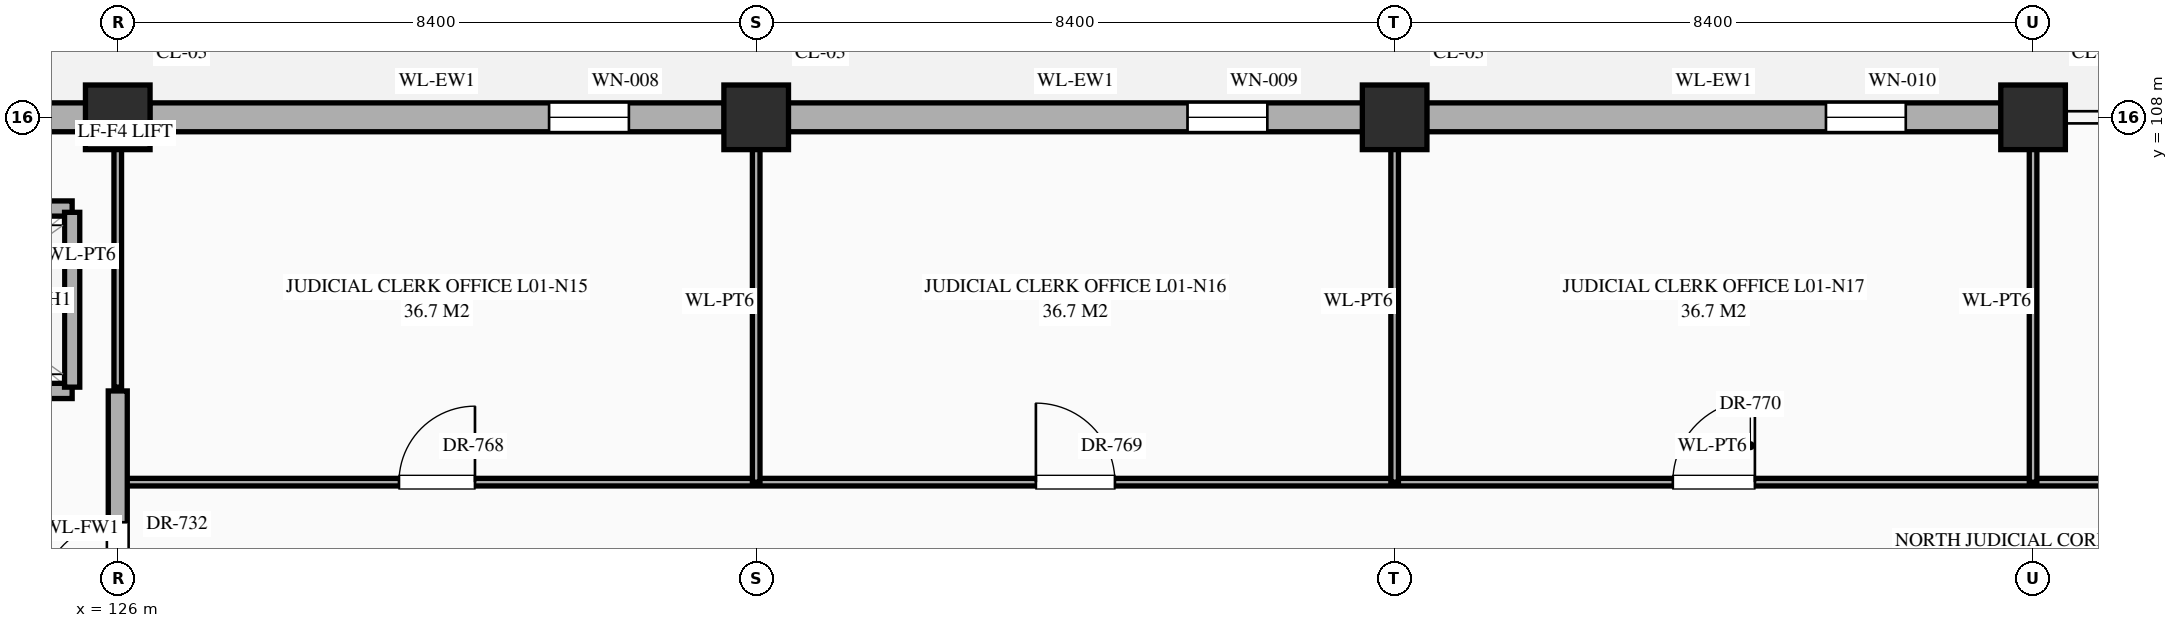
"""IFC4 building model, lengths in metres.
Left out: names, types, materials, properties, quantities, classifications, styles, units other than length and angle.
Written with IfcOpenShell. Run it as: python <this file> out.ifc"""

import sys

from ifc_helpers import new_model, si_unit, direction, frame, frame_2d, origin, origin_2d, place, context, subcontext, project, spatial, rectangle, extrude, element, fill, save


model = new_model("IFC4")
c1 = context("Model", 3, precision=1e-05, world=origin(), true_north=direction((0.0, 1.0)))
c2 = subcontext(c1, "Body", "Model", "MODEL_VIEW")
j1 = project(units=[si_unit("LENGTHUNIT", "METRE"), si_unit("PLANEANGLEUNIT", "RADIAN")], contexts=[c1])
p1 = place(None, origin())
s1 = spatial("IfcSite", under=j1, at=p1, CompositionType="ELEMENT")
p2 = place(p1, origin())
s2 = spatial("IfcBuilding", under=s1, at=p2, CompositionType="ELEMENT")
p3 = place(p2, origin())
s3 = spatial("IfcBuildingStorey", under=s2, at=p3, CompositionType="ELEMENT", Elevation=0.0)
for number, where, z_axis, x_axis in (
    (1, (126.0, 108.0, 0.0), (0.0, 0.0, 1.0), (1.0, 0.0, 0.0)),
    (2, (134.4, 108.0, 0.0), (0.0, 0.0, 1.0), (1.0, 0.0, 0.0)),
    (3, (142.8, 108.0, 0.0), (0.0, 0.0, 1.0), (1.0, 0.0, 0.0)),
    (4, (151.2, 108.0, 0.0), (0.0, 0.0, 1.0), (1.0, 0.0, 0.0)),
):
    element("IfcColumn", number, at=place(p3, frame(where, z_axis=z_axis, x_axis=x_axis)), inside=s3, PredefinedType="COLUMN", context=c2, shape_type="SweptSolid", body=[
        extrude(rectangle(XDim=0.85, YDim=0.85, at=origin_2d()), origin(), (0.0, 0.0, 1.0), 5.4),
    ])
p4 = place(p3, frame((118.045, 108.0, 0.0), z_axis=(0.0, 0.0, 1.0), x_axis=(1.0, 0.0, 0.0)))
e5 = element("IfcWall", 5, at=p4, inside=s3, PredefinedType="STANDARD", context=c2, shape_type="SweptSolid", body=[
    extrude(rectangle(XDim=7.535, YDim=0.38, at=frame_2d((3.768, 0.0))), origin(), (0.0, 0.0, 1.0), 4.47),
])
p5 = place(p3, frame((126.42, 108.0, 0.0), z_axis=(0.0, 0.0, 1.0), x_axis=(1.0, 0.0, 0.0)))
e6 = element("IfcWall", 6, at=p5, inside=s3, PredefinedType="STANDARD", context=c2, shape_type="SweptSolid", body=[
    extrude(rectangle(XDim=7.56, YDim=0.38, at=frame_2d((3.78, 0.0))), origin(), (0.0, 0.0, 1.0), 4.47),
])
p6 = place(p5, frame((5.255, 0.0, 0.85)))
e7 = element("IfcOpeningElement", 7, at=p6, cuts=e6, PredefinedType="OPENING", context=c2, shape_type="SweptSolid", body=[
    extrude(rectangle(XDim=1.05, YDim=1.56, at=frame_2d((0.525, 0.78))), frame((0.0, 0.202, 0.0), z_axis=(0.0, -1.0, 0.0), x_axis=(1.0, 0.0, 0.0)), (0.0, 0.0, 1.0), 0.404),
])
p7 = place(p3, frame((134.82, 108.0, 0.0), z_axis=(0.0, 0.0, 1.0), x_axis=(1.0, 0.0, 0.0)))
e8 = element("IfcWall", 8, at=p7, inside=s3, PredefinedType="STANDARD", context=c2, shape_type="SweptSolid", body=[
    extrude(rectangle(XDim=7.56, YDim=0.38, at=frame_2d((3.78, 0.0))), origin(), (0.0, 0.0, 1.0), 4.47),
])
p8 = place(p7, frame((5.255, 0.0, 0.85)))
e9 = element("IfcOpeningElement", 9, at=p8, cuts=e8, PredefinedType="OPENING", context=c2, shape_type="SweptSolid", body=[
    extrude(rectangle(XDim=1.05, YDim=1.74, at=frame_2d((0.525, 0.87))), frame((0.0, 0.202, 0.0), z_axis=(0.0, -1.0, 0.0), x_axis=(1.0, 0.0, 0.0)), (0.0, 0.0, 1.0), 0.404),
])
p9 = place(p3, frame((143.22, 108.0, 0.0), z_axis=(0.0, 0.0, 1.0), x_axis=(1.0, 0.0, 0.0)))
e10 = element("IfcWall", 10, at=p9, inside=s3, PredefinedType="STANDARD", context=c2, shape_type="SweptSolid", body=[
    extrude(rectangle(XDim=7.56, YDim=0.38, at=frame_2d((3.78, 0.0))), origin(), (0.0, 0.0, 1.0), 4.47),
])
p10 = place(p9, frame((5.255, 0.0, 0.85)))
e11 = element("IfcOpeningElement", 11, at=p10, cuts=e10, PredefinedType="OPENING", context=c2, shape_type="SweptSolid", body=[
    extrude(rectangle(XDim=1.05, YDim=1.92, at=frame_2d((0.525, 0.96))), frame((0.0, 0.202, 0.0), z_axis=(0.0, -1.0, 0.0), x_axis=(1.0, 0.0, 0.0)), (0.0, 0.0, 1.0), 0.404),
])
p11 = place(p3, frame((126.0, 103.2, 0.0), z_axis=(0.0, 0.0, 1.0), x_axis=(1.0, 0.0, 0.0)))
e12 = element("IfcWall", 12, at=p11, inside=s3, PredefinedType="STANDARD", context=c2, shape_type="SweptSolid", body=[
    extrude(rectangle(XDim=41.96, YDim=0.1, at=frame_2d((20.98, 0.0))), origin(), (0.0, 0.0, 1.0), 5.12),
])
p12 = place(p11, frame((3.7, 0.0, 0.0)))
e13 = element("IfcOpeningElement", 13, at=p12, cuts=e12, PredefinedType="OPENING", context=c2, shape_type="SweptSolid", body=[
    extrude(rectangle(XDim=1.0, YDim=2.25, at=frame_2d((0.5, 1.125))), frame((0.0, 0.062, 0.0), z_axis=(0.0, -1.0, 0.0), x_axis=(1.0, 0.0, 0.0)), (0.0, 0.0, 1.0), 0.124),
])
p13 = place(p11, frame((12.08, 0.0, 0.0)))
e14 = element("IfcOpeningElement", 14, at=p13, cuts=e12, PredefinedType="OPENING", context=c2, shape_type="SweptSolid", body=[
    extrude(rectangle(XDim=1.04, YDim=2.2, at=frame_2d((0.52, 1.1))), frame((0.0, 0.062, 0.0), z_axis=(0.0, -1.0, 0.0), x_axis=(1.0, 0.0, 0.0)), (0.0, 0.0, 1.0), 0.124),
])
p14 = place(p11, frame((20.46, 0.0, 0.0)))
e15 = element("IfcOpeningElement", 15, at=p14, cuts=e12, PredefinedType="OPENING", context=c2, shape_type="SweptSolid", body=[
    extrude(rectangle(XDim=1.08, YDim=2.25, at=frame_2d((0.54, 1.125))), frame((0.0, 0.062, 0.0), z_axis=(0.0, -1.0, 0.0), x_axis=(1.0, 0.0, 0.0)), (0.0, 0.0, 1.0), 0.124),
])
p15 = place(p11, frame((28.84, 0.0, 0.0)))
e16 = element("IfcOpeningElement", 16, at=p15, cuts=e12, PredefinedType="OPENING", context=c2, shape_type="SweptSolid", body=[
    extrude(rectangle(XDim=1.12, YDim=2.25, at=frame_2d((0.56, 1.125))), frame((0.0, 0.062, 0.0), z_axis=(0.0, -1.0, 0.0), x_axis=(1.0, 0.0, 0.0)), (0.0, 0.0, 1.0), 0.124),
])
p16 = place(p11, frame((37.2, 0.0, 0.0)))
e17 = element("IfcOpeningElement", 17, at=p16, cuts=e12, PredefinedType="OPENING", context=c2, shape_type="SweptSolid", body=[
    extrude(rectangle(XDim=1.16, YDim=2.3, at=frame_2d((0.58, 1.15))), frame((0.0, 0.062, 0.0), z_axis=(0.0, -1.0, 0.0), x_axis=(1.0, 0.0, 0.0)), (0.0, 0.0, 1.0), 0.124),
])
p17 = place(p3, frame((122.4, 104.4, 0.0), z_axis=(0.0, 0.0, 1.0), x_axis=(1.0, 0.0, 0.0)))
e18 = element("IfcWall", 18, at=p17, inside=s3, PredefinedType="STANDARD", context=c2, shape_type="SweptSolid", body=[
    extrude(rectangle(XDim=3.0, YDim=0.2, at=frame_2d((1.5, 0.0))), origin(), (0.0, 0.0, 1.0), 5.12),
])
p18 = place(p17, frame((0.9, 0.0, 0.0)))
e19 = element("IfcOpeningElement", 19, at=p18, cuts=e18, PredefinedType="OPENING", context=c2, shape_type="SweptSolid", body=[
    extrude(rectangle(XDim=1.2, YDim=2.15, at=frame_2d((0.6, 1.075))), frame((0.0, 0.112, 0.0), z_axis=(0.0, -1.0, 0.0), x_axis=(1.0, 0.0, 0.0)), (0.0, 0.0, 1.0), 0.224),
])
p19 = place(p3, frame((122.4, 106.8, 0.0), z_axis=(0.0, 0.0, 1.0), x_axis=(1.0, 0.0, 0.0)))
e20 = element("IfcWall", 20, at=p19, inside=s3, PredefinedType="STANDARD", context=c2, shape_type="SweptSolid", body=[
    extrude(rectangle(XDim=3.0, YDim=0.2, at=frame_2d((1.5, 0.0))), origin(), (0.0, 0.0, 1.0), 5.12),
])
p20 = place(p3, frame((125.4, 104.45, 0.0), z_axis=(0.0, 0.0, 1.0), x_axis=(0.0, 1.0, 0.0)))
e21 = element("IfcWall", 21, at=p20, inside=s3, PredefinedType="STANDARD", context=c2, shape_type="SweptSolid", body=[
    extrude(rectangle(XDim=2.3, YDim=0.2, at=frame_2d((1.15, 0.0))), origin(), (0.0, 0.0, 1.0), 5.12),
])
p21 = place(p3, frame((126.0, 100.8, 0.0), z_axis=(0.0, 0.0, 1.0), x_axis=(0.0, 1.0, 0.0)))
e22 = element("IfcWall", 22, at=p21, inside=s3, PredefinedType="STANDARD", context=c2, shape_type="SweptSolid", body=[
    extrude(rectangle(XDim=3.6, YDim=0.25, at=frame_2d((1.8, 0.0))), origin(), (0.0, 0.0, 1.0), 4.37),
])
p22 = place(p21, frame((0.873, 0.0, 0.0)))
e23 = element("IfcOpeningElement", 23, at=p22, cuts=e22, PredefinedType="OPENING", context=c2, shape_type="SweptSolid", body=[
    extrude(rectangle(XDim=1.0, YDim=2.2, at=frame_2d((0.5, 1.1))), frame((0.0, 0.137, 0.0), z_axis=(0.0, -1.0, 0.0), x_axis=(1.0, 0.0, 0.0)), (0.0, 0.0, 1.0), 0.274),
])
p23 = place(p3, frame((126.0, 104.45, 0.0), z_axis=(0.0, 0.0, 1.0), x_axis=(0.0, 1.0, 0.0)))
e24 = element("IfcWall", 24, at=p23, inside=s3, PredefinedType="STANDARD", context=c2, shape_type="SweptSolid", body=[
    extrude(rectangle(XDim=3.46, YDim=0.1, at=frame_2d((1.73, 0.0))), origin(), (0.0, 0.0, 1.0), 4.37),
])
for number, where, z_axis, x_axis in (
    (25, (134.4, 103.2, 0.0), (0.0, 0.0, 1.0), (0.0, 1.0, 0.0)),
    (26, (142.8, 103.2, 0.0), (0.0, 0.0, 1.0), (0.0, 1.0, 0.0)),
    (27, (151.2, 103.2, 0.0), (0.0, 0.0, 1.0), (0.0, 1.0, 0.0)),
):
    element("IfcWall", number, at=place(p3, frame(where, z_axis=z_axis, x_axis=x_axis)), inside=s3, PredefinedType="STANDARD", context=c2, shape_type="SweptSolid", body=[
        extrude(rectangle(XDim=4.76, YDim=0.1, at=frame_2d((2.38, 0.0))), origin(), (0.0, 0.0, 1.0), 4.37),
    ])
p24 = place(p6, origin())
e28 = element("IfcWindow", 28, at=p24, inside=s3, PartitioningType="SINGLE_PANEL", PredefinedType="WINDOW", context=c2, shape_type="SweptSolid", body=[
    extrude(rectangle(XDim=1.05, YDim=1.56, at=frame_2d((0.525, 0.78))), frame((0.0, 0.03, 0.0), z_axis=(0.0, -1.0, 0.0), x_axis=(1.0, 0.0, 0.0)), (0.0, 0.0, 1.0), 0.06),
])
fill(e7, e28)
p25 = place(p8, origin())
e29 = element("IfcWindow", 29, at=p25, inside=s3, PartitioningType="SINGLE_PANEL", PredefinedType="WINDOW", context=c2, shape_type="SweptSolid", body=[
    extrude(rectangle(XDim=1.05, YDim=1.74, at=frame_2d((0.525, 0.87))), frame((0.0, 0.03, 0.0), z_axis=(0.0, -1.0, 0.0), x_axis=(1.0, 0.0, 0.0)), (0.0, 0.0, 1.0), 0.06),
])
fill(e9, e29)
p26 = place(p10, origin())
e30 = element("IfcWindow", 30, at=p26, inside=s3, PartitioningType="SINGLE_PANEL", PredefinedType="WINDOW", context=c2, shape_type="SweptSolid", body=[
    extrude(rectangle(XDim=1.05, YDim=1.92, at=frame_2d((0.525, 0.96))), frame((0.0, 0.03, 0.0), z_axis=(0.0, -1.0, 0.0), x_axis=(1.0, 0.0, 0.0)), (0.0, 0.0, 1.0), 0.06),
])
fill(e11, e30)
p27 = place(p22, origin())
e31 = element("IfcDoor", 31, at=p27, inside=s3, OperationType="SINGLE_SWING_LEFT", PredefinedType="DOOR", context=c2, shape_type="SweptSolid", body=[
    extrude(rectangle(XDim=1.0, YDim=2.2, at=frame_2d((0.5, 1.1))), frame((0.0, 0.025, 0.0), z_axis=(0.0, -1.0, 0.0), x_axis=(1.0, 0.0, 0.0)), (0.0, 0.0, 1.0), 0.05),
])
fill(e23, e31)
p28 = place(p12, origin())
e32 = element("IfcDoor", 32, at=p28, inside=s3, OperationType="SINGLE_SWING_RIGHT", PredefinedType="DOOR", context=c2, shape_type="SweptSolid", body=[
    extrude(rectangle(XDim=1.0, YDim=2.25, at=frame_2d((0.5, 1.125))), frame((0.0, 0.025, 0.0), z_axis=(0.0, -1.0, 0.0), x_axis=(1.0, 0.0, 0.0)), (0.0, 0.0, 1.0), 0.05),
])
fill(e13, e32)
p29 = place(p13, origin())
e33 = element("IfcDoor", 33, at=p29, inside=s3, OperationType="SINGLE_SWING_LEFT", PredefinedType="DOOR", context=c2, shape_type="SweptSolid", body=[
    extrude(rectangle(XDim=1.04, YDim=2.2, at=frame_2d((0.52, 1.1))), frame((0.0, 0.025, 0.0), z_axis=(0.0, -1.0, 0.0), x_axis=(1.0, 0.0, 0.0)), (0.0, 0.0, 1.0), 0.05),
])
fill(e14, e33)
p30 = place(p14, origin())
e34 = element("IfcDoor", 34, at=p30, inside=s3, OperationType="SINGLE_SWING_RIGHT", PredefinedType="DOOR", context=c2, shape_type="SweptSolid", body=[
    extrude(rectangle(XDim=1.08, YDim=2.25, at=frame_2d((0.54, 1.125))), frame((0.0, 0.025, 0.0), z_axis=(0.0, -1.0, 0.0), x_axis=(1.0, 0.0, 0.0)), (0.0, 0.0, 1.0), 0.05),
])
fill(e15, e34)
save(model, sys.argv[1])
